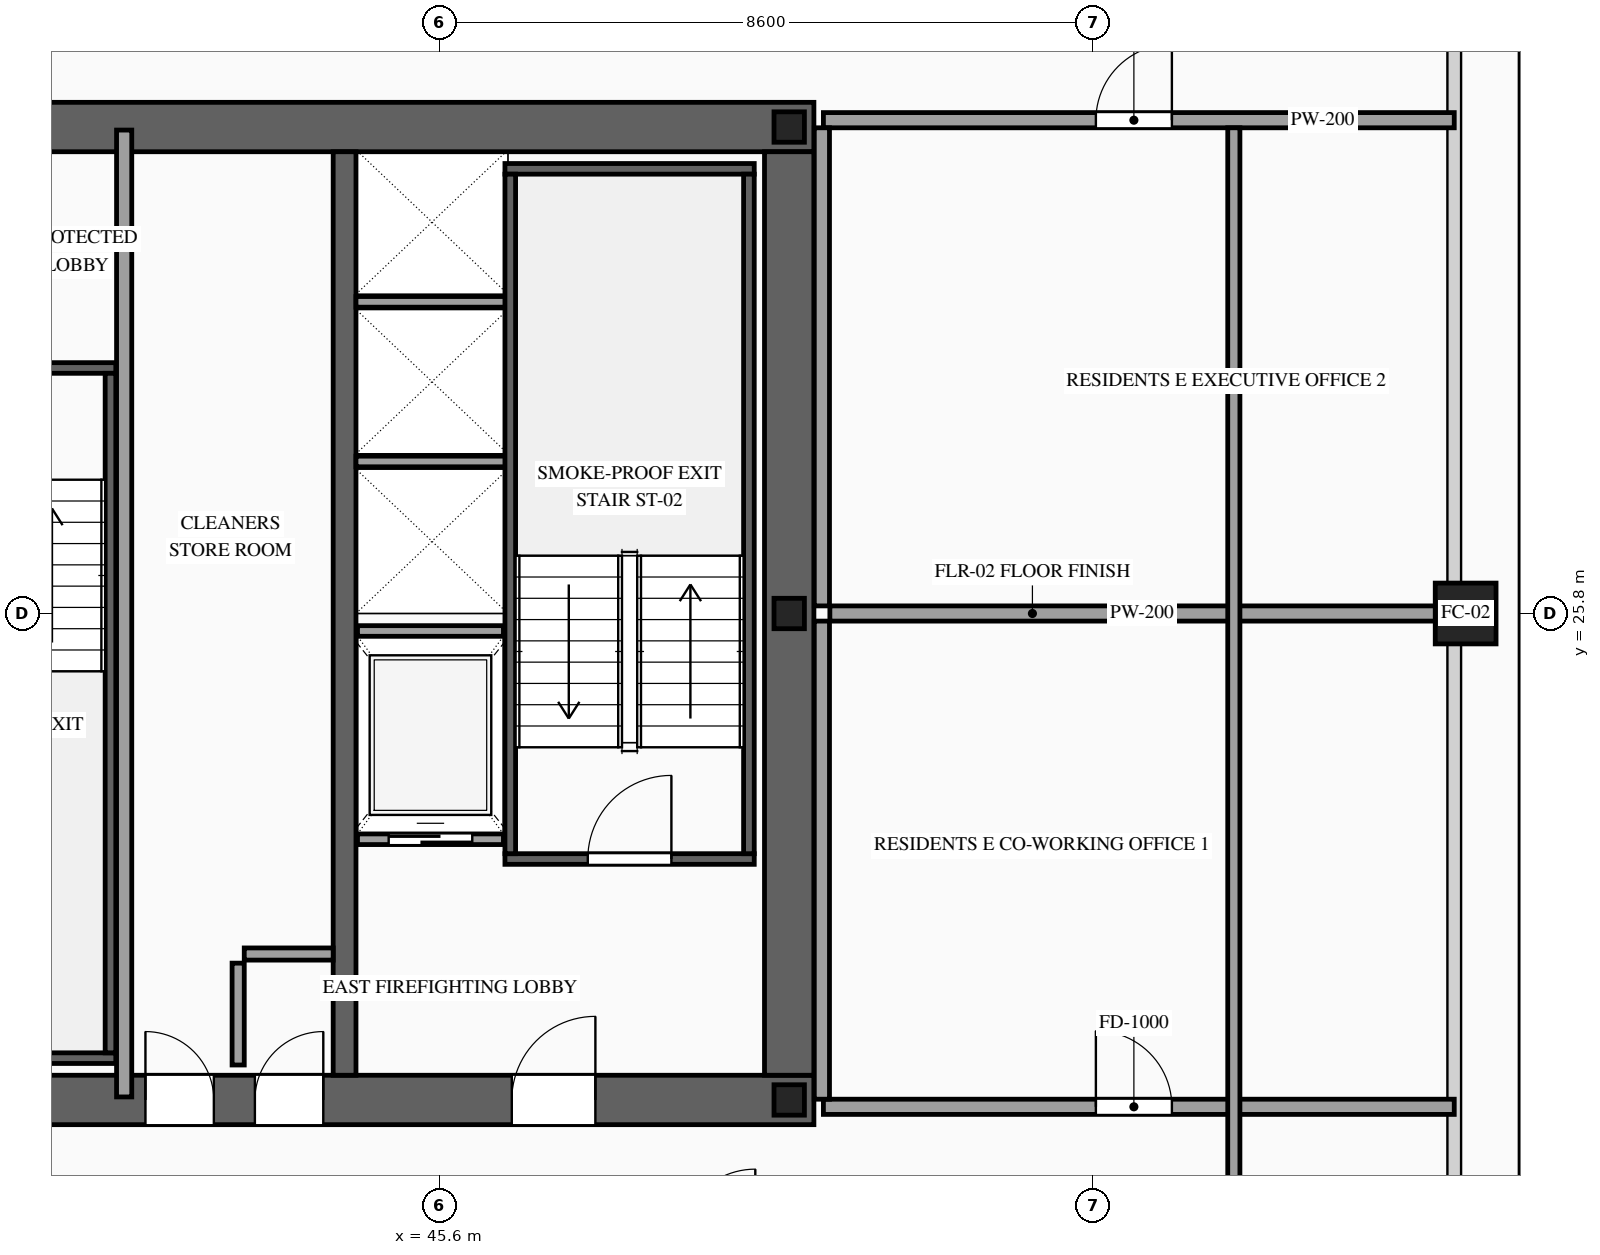
"""IFC4 building model, lengths in metres.
Left out: names, types, materials, properties, quantities, classifications, styles, units other than length and angle.
Written with IfcOpenShell. Run it as: python <this file> out.ifc"""

import sys

from ifc_helpers import new_model, si_unit, direction, frame, frame_2d, origin, origin_2d, place, context, subcontext, project, spatial, rectangle, hollow_rectangle, i_section, extrude, source, transform, mapped, element, fill, save


model = new_model("IFC4")
c1 = context("Model", 3, precision=1e-05, world=origin(), true_north=direction((0.0, 1.0)))
c2 = subcontext(c1, "Body", "Model", "MODEL_VIEW")
j1 = project(units=[si_unit("LENGTHUNIT", "METRE"), si_unit("PLANEANGLEUNIT", "RADIAN")], contexts=[c1])
p1 = place(None, origin())
s1 = spatial("IfcSite", under=j1, at=p1, CompositionType="ELEMENT")
p2 = place(p1, origin())
s2 = spatial("IfcBuilding", under=s1, at=p2, CompositionType="ELEMENT")
p3 = place(p2, frame((0.0, 0.0, 209.0)))
s3 = spatial("IfcBuildingStorey", under=s2, at=p3, CompositionType="ELEMENT", Elevation=209.0)
p4 = place(p3, frame((23.475, 19.4, 0.0), z_axis=(0.0, 0.0, 1.0), x_axis=(1.0, 0.0, 0.0)))
e1 = element("IfcWall", 1, at=p4, inside=s3, PredefinedType="SHEAR", context=c2, shape_type="SweptSolid", body=[
    extrude(rectangle(XDim=27.05, YDim=0.65, at=frame_2d((13.525, 0.0))), origin(), (0.0, 0.0, 1.0), 3.5),
])
p5 = place(p4, frame((1.975, 0.0, 0.0)))
e2 = element("IfcOpeningElement", 2, at=p5, cuts=e1, PredefinedType="OPENING", context=c2, shape_type="SweptSolid", body=[
    extrude(rectangle(XDim=1.1, YDim=2.2, at=frame_2d((0.55, 1.1))), frame((0.0, 0.34, 0.0), z_axis=(0.0, -1.0, 0.0), x_axis=(1.0, 0.0, 0.0)), (0.0, 0.0, 1.0), 0.68),
])
p6 = place(p4, frame((9.875, 0.0, 0.0)))
e3 = element("IfcOpeningElement", 3, at=p6, cuts=e1, PredefinedType="OPENING", context=c2, shape_type="SweptSolid", body=[
    extrude(rectangle(XDim=1.1, YDim=2.2, at=frame_2d((0.55, 1.1))), frame((0.0, 0.34, 0.0), z_axis=(0.0, -1.0, 0.0), x_axis=(1.0, 0.0, 0.0)), (0.0, 0.0, 1.0), 0.68),
])
p7 = place(p4, frame((23.075, 0.0, 0.0)))
e4 = element("IfcOpeningElement", 4, at=p7, cuts=e1, PredefinedType="OPENING", context=c2, shape_type="SweptSolid", body=[
    extrude(rectangle(XDim=1.1, YDim=2.2, at=frame_2d((0.55, 1.1))), frame((0.0, 0.34, 0.0), z_axis=(0.0, -1.0, 0.0), x_axis=(1.0, 0.0, 0.0)), (0.0, 0.0, 1.0), 0.68),
])
p8 = place(p4, frame((19.695, 0.0, 0.0)))
e5 = element("IfcOpeningElement", 5, at=p8, cuts=e1, PredefinedType="OPENING", context=c2, shape_type="SweptSolid", body=[
    extrude(rectangle(XDim=0.9, YDim=2.15, at=frame_2d((0.45, 1.075))), frame((0.0, 0.34, 0.0), z_axis=(0.0, -1.0, 0.0), x_axis=(1.0, 0.0, 0.0)), (0.0, 0.0, 1.0), 0.68),
])
p9 = place(p4, frame((18.255, 0.0, 0.0)))
e6 = element("IfcOpeningElement", 6, at=p9, cuts=e1, PredefinedType="OPENING", context=c2, shape_type="SweptSolid", body=[
    extrude(rectangle(XDim=0.9, YDim=2.15, at=frame_2d((0.45, 1.075))), frame((0.0, 0.34, 0.0), z_axis=(0.0, -1.0, 0.0), x_axis=(1.0, 0.0, 0.0)), (0.0, 0.0, 1.0), 0.68),
])
p10 = place(p3, frame((23.475, 32.2, 0.0), z_axis=(0.0, 0.0, 1.0), x_axis=(1.0, 0.0, 0.0)))
e7 = element("IfcWall", 7, at=p10, inside=s3, PredefinedType="SHEAR", context=c2, shape_type="SweptSolid", body=[
    extrude(rectangle(XDim=27.05, YDim=0.65, at=frame_2d((13.525, 0.0))), origin(), (0.0, 0.0, 1.0), 3.5),
])
p11 = place(p10, frame((4.595, 0.0, 0.0)))
e8 = element("IfcOpeningElement", 8, at=p11, cuts=e7, PredefinedType="OPENING", context=c2, shape_type="SweptSolid", body=[
    extrude(rectangle(XDim=0.9, YDim=2.15, at=frame_2d((0.45, 1.075))), frame((0.0, 0.34, 0.0), z_axis=(0.0, -1.0, 0.0), x_axis=(1.0, 0.0, 0.0)), (0.0, 0.0, 1.0), 0.68),
])
p12 = place(p10, frame((9.875, 0.0, 0.0)))
e9 = element("IfcOpeningElement", 9, at=p12, cuts=e7, PredefinedType="OPENING", context=c2, shape_type="SweptSolid", body=[
    extrude(rectangle(XDim=1.1, YDim=2.2, at=frame_2d((0.55, 1.1))), frame((0.0, 0.34, 0.0), z_axis=(0.0, -1.0, 0.0), x_axis=(1.0, 0.0, 0.0)), (0.0, 0.0, 1.0), 0.68),
])
p13 = place(p10, frame((15.725, 0.0, 0.0)))
e10 = element("IfcOpeningElement", 10, at=p13, cuts=e7, PredefinedType="OPENING", context=c2, shape_type="SweptSolid", body=[
    extrude(rectangle(XDim=1.1, YDim=2.2, at=frame_2d((0.55, 1.1))), frame((0.0, 0.34, 0.0), z_axis=(0.0, -1.0, 0.0), x_axis=(1.0, 0.0, 0.0)), (0.0, 0.0, 1.0), 0.68),
])
m1 = source(origin(), c2, "Body", "SweptSolid", [
    extrude(rectangle(XDim=12.15, YDim=0.65, at=frame_2d((6.075, 0.0))), origin(), (0.0, 0.0, 1.0), 3.5),
])
p14 = place(p3, frame((50.2, 19.725, 0.0), z_axis=(0.0, 0.0, 1.0), x_axis=(0.0, 1.0, 0.0)))
e11 = element("IfcWall", 11, at=p14, inside=s3, PredefinedType="SHEAR", context=c2, shape_type="MappedRepresentation", body=[
    mapped(m1, transform((0.0, 0.0, 0.0), scale=1.0)),
])
m2 = source(origin(), c2, "Body", "SweptSolid", [
    extrude(rectangle(XDim=12.15, YDim=0.3, at=frame_2d((6.075, 0.0))), origin(), (0.0, 0.0, 1.0), 3.5),
])
p15 = place(p3, frame((44.35, 19.725, 0.0), z_axis=(0.0, 0.0, 1.0), x_axis=(0.0, 1.0, 0.0)))
e12 = element("IfcWall", 12, at=p15, inside=s3, PredefinedType="SOLIDWALL", context=c2, shape_type="MappedRepresentation", body=[
    mapped(m2, transform((0.0, 0.0, 0.0), scale=1.0)),
])
m3 = source(origin(), c2, "Body", "SweptSolid", [
    extrude(i_section(OverallWidth=0.4, OverallDepth=0.4, WebThickness=0.013, FlangeThickness=0.021, at=origin_2d()), origin(), (0.0, 0.0, 1.0), 3.5),
])
for number, where, z_axis, x_axis in (
    (13, (50.2, 19.4, 0.0), (0.0, 0.0, 1.0), (1.0, 0.0, 0.0)),
    (14, (50.2, 25.8, 0.0), (0.0, 0.0, 1.0), (1.0, 0.0, 0.0)),
    (15, (50.2, 32.2, 0.0), (0.0, 0.0, 1.0), (1.0, 0.0, 0.0)),
):
    element("IfcColumn", number, at=place(p3, frame(where, z_axis=z_axis, x_axis=x_axis)), inside=s3, PredefinedType="COLUMN", context=c2, shape_type="MappedRepresentation", body=[
        mapped(m3, transform((0.0, 0.0, 0.0), scale=1.0)),
    ])
m4 = source(origin(), c2, "Body", "SweptSolid", [
    extrude(hollow_rectangle(XDim=0.8, YDim=0.8, WallThickness=0.036, at=origin_2d()), origin(), (0.0, 0.0, 1.0), 3.5),
])
p16 = place(p3, frame((59.1, 25.8, 0.0), z_axis=(0.0, 0.0, 1.0), x_axis=(1.0, 0.0, 0.0)))
e16 = element("IfcColumn", 16, at=p16, inside=s3, PredefinedType="COLUMN", context=c2, shape_type="MappedRepresentation", body=[
    mapped(m4, transform((0.0, 0.0, 0.0), scale=1.0)),
])
p17 = place(p3, frame((44.52, 22.83, 0.0), z_axis=(0.0, 0.0, 1.0), x_axis=(1.0, 0.0, 0.0)))
e17 = element("IfcWall", 17, at=p17, inside=s3, PredefinedType="SOLIDWALL", context=c2, shape_type="SweptSolid", body=[
    extrude(rectangle(XDim=1.92, YDim=0.14, at=frame_2d((0.96, 0.0))), origin(), (0.0, 0.0, 1.0), 3.28),
])
p18 = place(p17, frame((0.41, 0.0, 0.0)))
e18 = element("IfcOpeningElement", 18, at=p18, cuts=e17, PredefinedType="OPENING", context=c2, shape_type="SweptSolid", body=[
    extrude(rectangle(XDim=1.1, YDim=2.2, at=frame_2d((0.55, 1.1))), frame((0.0, 0.085, 0.0), z_axis=(0.0, -1.0, 0.0), x_axis=(1.0, 0.0, 0.0)), (0.0, 0.0, 1.0), 0.17),
])
m5 = source(origin(), c2, "Body", "SweptSolid", [
    extrude(rectangle(XDim=1.92, YDim=0.14, at=frame_2d((0.96, 0.0))), origin(), (0.0, 0.0, 1.0), 3.28),
])
p19 = place(p3, frame((44.52, 25.57, 0.0), z_axis=(0.0, 0.0, 1.0), x_axis=(1.0, 0.0, 0.0)))
e19 = element("IfcWall", 19, at=p19, inside=s3, PredefinedType="SOLIDWALL", context=c2, shape_type="MappedRepresentation", body=[
    mapped(m5, transform((0.0, 0.0, 0.0), scale=1.0)),
])
m6 = source(origin(), c2, "Body", "SweptSolid", [
    extrude(rectangle(XDim=2.0, YDim=0.14, at=frame_2d((1.0, 0.0))), origin(), (0.0, 0.0, 1.0), 3.28),
])
for number, where, z_axis, x_axis in (
    (20, (44.5, 27.8, 0.0), (0.0, 0.0, 1.0), (1.0, 0.0, 0.0)),
    (21, (44.5, 29.9, 0.0), (0.0, 0.0, 1.0), (1.0, 0.0, 0.0)),
):
    element("IfcWall", number, at=place(p3, frame(where, z_axis=z_axis, x_axis=x_axis)), inside=s3, PredefinedType="SOLIDWALL", context=c2, shape_type="MappedRepresentation", body=[
        mapped(m6, transform((0.0, 0.0, 0.0), scale=1.0)),
    ])
p20 = place(p3, frame((46.46, 22.57, 0.0), z_axis=(0.0, 0.0, 1.0), x_axis=(1.0, 0.0, 0.0)))
e22 = element("IfcWall", 22, at=p20, inside=s3, PredefinedType="SOLIDWALL", context=c2, shape_type="SweptSolid", body=[
    extrude(rectangle(XDim=3.28, YDim=0.14, at=frame_2d((1.64, 0.0))), origin(), (0.0, 0.0, 1.0), 3.28),
])
p21 = place(p20, frame((1.09, 0.0, 0.0)))
e23 = element("IfcOpeningElement", 23, at=p21, cuts=e22, PredefinedType="OPENING", context=c2, shape_type="SweptSolid", body=[
    extrude(rectangle(XDim=1.1, YDim=2.2, at=frame_2d((0.55, 1.1))), frame((0.0, 0.085, 0.0), z_axis=(0.0, -1.0, 0.0), x_axis=(1.0, 0.0, 0.0)), (0.0, 0.0, 1.0), 0.17),
])
m7 = source(origin(), c2, "Body", "SweptSolid", [
    extrude(rectangle(XDim=3.28, YDim=0.14, at=frame_2d((1.64, 0.0))), origin(), (0.0, 0.0, 1.0), 3.28),
])
p22 = place(p3, frame((46.46, 31.65, 0.0), z_axis=(0.0, 0.0, 1.0), x_axis=(1.0, 0.0, 0.0)))
e24 = element("IfcWall", 24, at=p22, inside=s3, PredefinedType="SOLIDWALL", context=c2, shape_type="MappedRepresentation", body=[
    mapped(m7, transform((0.0, 0.0, 0.0), scale=1.0)),
])
m8 = source(origin(), c2, "Body", "SweptSolid", [
    extrude(rectangle(XDim=8.94, YDim=0.14, at=frame_2d((4.47, 0.0))), origin(), (0.0, 0.0, 1.0), 3.28),
])
for number, where, z_axis, x_axis in (
    (25, (46.53, 22.64, 0.0), (0.0, 0.0, 1.0), (0.0, 1.0, 0.0)),
    (26, (49.67, 22.64, 0.0), (0.0, 0.0, 1.0), (0.0, 1.0, 0.0)),
):
    element("IfcWall", number, at=place(p3, frame(where, z_axis=z_axis, x_axis=x_axis)), inside=s3, PredefinedType="SOLIDWALL", context=c2, shape_type="MappedRepresentation", body=[
        mapped(m8, transform((0.0, 0.0, 0.0), scale=1.0)),
    ])
p23 = place(p3, frame((38.2, 29.03, 0.0), z_axis=(0.0, 0.0, 1.0), x_axis=(1.0, 0.0, 0.0)))
e27 = element("IfcWall", 27, at=p23, inside=s3, PredefinedType="SOLIDWALL", context=c2, shape_type="SweptSolid", body=[
    extrude(rectangle(XDim=3.14, YDim=0.14, at=frame_2d((1.57, 0.0))), origin(), (0.0, 0.0, 1.0), 3.28),
])
p24 = place(p23, frame((1.02, 0.0, 0.0)))
e28 = element("IfcOpeningElement", 28, at=p24, cuts=e27, PredefinedType="OPENING", context=c2, shape_type="SweptSolid", body=[
    extrude(rectangle(XDim=1.1, YDim=2.2, at=frame_2d((0.55, 1.1))), frame((0.0, 0.085, 0.0), z_axis=(0.0, -1.0, 0.0), x_axis=(1.0, 0.0, 0.0)), (0.0, 0.0, 1.0), 0.17),
])
m9 = source(origin(), c2, "Body", "SweptSolid", [
    extrude(rectangle(XDim=3.14, YDim=0.14, at=frame_2d((1.57, 0.0))), origin(), (0.0, 0.0, 1.0), 3.28),
])
p25 = place(p3, frame((38.2, 19.95, 0.0), z_axis=(0.0, 0.0, 1.0), x_axis=(1.0, 0.0, 0.0)))
e29 = element("IfcWall", 29, at=p25, inside=s3, PredefinedType="SOLIDWALL", context=c2, shape_type="MappedRepresentation", body=[
    mapped(m9, transform((0.0, 0.0, 0.0), scale=1.0)),
])
m10 = source(origin(), c2, "Body", "SweptSolid", [
    extrude(rectangle(XDim=8.94, YDim=0.14, at=frame_2d((4.47, 0.0))), origin(), (0.0, 0.0, 1.0), 3.28),
])
p26 = place(p3, frame((41.27, 20.02, 0.0), z_axis=(0.0, 0.0, 1.0), x_axis=(0.0, 1.0, 0.0)))
e30 = element("IfcWall", 30, at=p26, inside=s3, PredefinedType="SOLIDWALL", context=c2, shape_type="MappedRepresentation", body=[
    mapped(m10, transform((0.0, 0.0, 0.0), scale=1.0)),
])
m11 = source(origin(), c2, "Body", "SweptSolid", [
    extrude(rectangle(XDim=1.34, YDim=0.16, at=frame_2d((0.67, 0.0))), origin(), (0.0, 0.0, 1.0), 3.28),
])
p27 = place(p3, frame((42.95, 19.86, 0.0), z_axis=(0.0, 0.0, 1.0), x_axis=(0.0, 1.0, 0.0)))
e31 = element("IfcWall", 31, at=p27, inside=s3, PredefinedType="PARTITIONING", context=c2, shape_type="MappedRepresentation", body=[
    mapped(m11, transform((0.0, 0.0, 0.0), scale=1.0)),
])
m12 = source(origin(), c2, "Body", "SweptSolid", [
    extrude(rectangle(XDim=1.17, YDim=0.16, at=frame_2d((0.585, 0.0))), origin(), (0.0, 0.0, 1.0), 3.28),
])
p28 = place(p3, frame((43.03, 21.32, 0.0), z_axis=(0.0, 0.0, 1.0), x_axis=(1.0, 0.0, 0.0)))
e32 = element("IfcWall", 32, at=p28, inside=s3, PredefinedType="PARTITIONING", context=c2, shape_type="MappedRepresentation", body=[
    mapped(m12, transform((0.0, 0.0, 0.0), scale=1.0)),
])
m13 = source(origin(), c2, "Body", "SweptSolid", [
    extrude(rectangle(XDim=12.72, YDim=0.2, at=frame_2d((6.36, 0.0))), origin(), (0.0, 0.0, 1.0), 3.28),
])
p29 = place(p3, frame((41.45, 19.44, 0.0), z_axis=(0.0, 0.0, 1.0), x_axis=(0.0, 1.0, 0.0)))
e33 = element("IfcWall", 33, at=p29, inside=s3, PredefinedType="PARTITIONING", context=c2, shape_type="MappedRepresentation", body=[
    mapped(m13, transform((0.0, 0.0, 0.0), scale=1.0)),
])
p30 = place(p3, frame((50.65, 19.31, 0.0), z_axis=(0.0, 0.0, 1.0), x_axis=(1.0, 0.0, 0.0)))
e34 = element("IfcWall", 34, at=p30, inside=s3, PredefinedType="PARTITIONING", context=c2, shape_type="SweptSolid", body=[
    extrude(rectangle(XDim=8.3, YDim=0.2, at=frame_2d((4.15, 0.0))), origin(), (0.0, 0.0, 1.0), 2.775),
])
p31 = place(p30, frame((3.585, 0.0, 0.0)))
e35 = element("IfcOpeningElement", 35, at=p31, cuts=e34, PredefinedType="OPENING", context=c2, shape_type="SweptSolid", body=[
    extrude(rectangle(XDim=1.0, YDim=2.2, at=frame_2d((0.5, 1.1))), frame((0.0, 0.115, 0.0), z_axis=(0.0, -1.0, 0.0), x_axis=(1.0, 0.0, 0.0)), (0.0, 0.0, 1.0), 0.23),
])
m14 = source(origin(), c2, "Body", "SweptSolid", [
    extrude(rectangle(XDim=8.215, YDim=0.2, at=frame_2d((4.107, 0.0))), origin(), (0.0, 0.0, 1.0), 2.687),
])
p32 = place(p3, frame((50.735, 25.8, 0.0), z_axis=(0.0, 0.0, 1.0), x_axis=(1.0, 0.0, 0.0)))
e36 = element("IfcWall", 36, at=p32, inside=s3, PredefinedType="PARTITIONING", context=c2, shape_type="MappedRepresentation", body=[
    mapped(m14, transform((0.0, 0.0, 0.0), scale=1.0)),
])
m15 = source(origin(), c2, "Body", "SweptSolid", [
    extrude(rectangle(XDim=6.29, YDim=0.2, at=frame_2d((3.145, 0.0))), origin(), (0.0, 0.0, 1.0), 3.28),
])
p33 = place(p3, frame((50.63, 19.41, 0.0), z_axis=(0.0, 0.0, 1.0), x_axis=(0.0, 1.0, 0.0)))
e37 = element("IfcWall", 37, at=p33, inside=s3, PredefinedType="PARTITIONING", context=c2, shape_type="MappedRepresentation", body=[
    mapped(m15, transform((0.0, 0.0, 0.0), scale=1.0)),
])
p34 = place(p3, frame((50.65, 32.29, 0.0), z_axis=(0.0, 0.0, 1.0), x_axis=(1.0, 0.0, 0.0)))
e38 = element("IfcWall", 38, at=p34, inside=s3, PredefinedType="PARTITIONING", context=c2, shape_type="SweptSolid", body=[
    extrude(rectangle(XDim=8.3, YDim=0.2, at=frame_2d((4.15, 0.0))), origin(), (0.0, 0.0, 1.0), 2.775),
])
p35 = place(p34, frame((3.585, 0.0, 0.0)))
e39 = element("IfcOpeningElement", 39, at=p35, cuts=e38, PredefinedType="OPENING", context=c2, shape_type="SweptSolid", body=[
    extrude(rectangle(XDim=1.0, YDim=2.2, at=frame_2d((0.5, 1.1))), frame((0.0, 0.115, 0.0), z_axis=(0.0, -1.0, 0.0), x_axis=(1.0, 0.0, 0.0)), (0.0, 0.0, 1.0), 0.23),
])
m16 = source(origin(), c2, "Body", "SweptSolid", [
    extrude(rectangle(XDim=28.19, YDim=0.16, at=frame_2d((14.095, 0.0))), origin(), (0.0, 0.0, 1.0), 3.28),
])
p36 = place(p3, frame((56.05, 4.0, 0.0), z_axis=(0.0, 0.0, 1.0), x_axis=(0.0, 1.0, 0.0)))
e40 = element("IfcWall", 40, at=p36, inside=s3, PredefinedType="PARTITIONING", context=c2, shape_type="MappedRepresentation", body=[
    mapped(m16, transform((0.0, 0.0, 0.0), scale=1.0)),
])
p37 = place(p3, frame((50.63, 25.9, 0.0), z_axis=(0.0, 0.0, 1.0), x_axis=(0.0, 1.0, 0.0)))
e41 = element("IfcWall", 41, at=p37, inside=s3, PredefinedType="PARTITIONING", context=c2, shape_type="MappedRepresentation", body=[
    mapped(m15, transform((0.0, 0.0, 0.0), scale=1.0)),
])
m17 = source(origin(), c2, "Body", "SweptSolid", [
    extrude(rectangle(XDim=1.1, YDim=2.2, at=frame_2d((0.55, 1.1))), frame((0.0, 0.025, 0.0), z_axis=(0.0, -1.0, 0.0), x_axis=(1.0, 0.0, 0.0)), (0.0, 0.0, 1.0), 0.05),
])
p38 = place(p18, origin())
e42 = element("IfcDoor", 42, at=p38, inside=s3, OperationType="SLIDING_TO_RIGHT", PredefinedType="DOOR", context=c2, shape_type="MappedRepresentation", body=[
    mapped(m17, transform((0.0, 0.0, 0.0), scale=1.0)),
])
fill(e18, e42)
m18 = source(origin(), c2, "Body", "SweptSolid", [
    extrude(rectangle(XDim=1.1, YDim=2.2, at=frame_2d((0.55, 1.1))), frame((0.0, 0.025, 0.0), z_axis=(0.0, -1.0, 0.0), x_axis=(1.0, 0.0, 0.0)), (0.0, 0.0, 1.0), 0.05),
])
p39 = place(p21, origin())
e43 = element("IfcDoor", 43, at=p39, inside=s3, OperationType="SINGLE_SWING_RIGHT", PredefinedType="DOOR", context=c2, shape_type="MappedRepresentation", body=[
    mapped(m18, transform((0.0, 0.0, 0.0), scale=1.0)),
])
fill(e23, e43)
p40 = place(p7, origin())
e44 = element("IfcDoor", 44, at=p40, inside=s3, OperationType="SINGLE_SWING_RIGHT", PredefinedType="DOOR", context=c2, shape_type="MappedRepresentation", body=[
    mapped(m18, transform((0.0, 0.0, 0.0), scale=1.0)),
])
fill(e4, e44)
m19 = source(origin(), c2, "Body", "SweptSolid", [
    extrude(rectangle(XDim=0.9, YDim=2.15, at=frame_2d((0.45, 1.075))), frame((0.0, 0.025, 0.0), z_axis=(0.0, -1.0, 0.0), x_axis=(1.0, 0.0, 0.0)), (0.0, 0.0, 1.0), 0.05),
])
p41 = place(p8, origin())
e45 = element("IfcDoor", 45, at=p41, inside=s3, OperationType="SINGLE_SWING_RIGHT", PredefinedType="DOOR", context=c2, shape_type="MappedRepresentation", body=[
    mapped(m19, transform((0.0, 0.0, 0.0), scale=1.0)),
])
fill(e5, e45)
p42 = place(p9, origin())
e46 = element("IfcDoor", 46, at=p42, inside=s3, OperationType="SINGLE_SWING_LEFT", PredefinedType="DOOR", context=c2, shape_type="MappedRepresentation", body=[
    mapped(m19, transform((0.0, 0.0, 0.0), scale=1.0)),
])
fill(e6, e46)
m20 = source(origin(), c2, "Body", "SweptSolid", [
    extrude(rectangle(XDim=1.0, YDim=2.2, at=frame_2d((0.5, 1.1))), frame((0.0, 0.025, 0.0), z_axis=(0.0, -1.0, 0.0), x_axis=(1.0, 0.0, 0.0)), (0.0, 0.0, 1.0), 0.05),
])
p43 = place(p31, origin())
e47 = element("IfcDoor", 47, at=p43, inside=s3, OperationType="SINGLE_SWING_LEFT", PredefinedType="DOOR", context=c2, shape_type="MappedRepresentation", body=[
    mapped(m20, transform((0.0, 0.0, 0.0), scale=1.0)),
])
fill(e35, e47)
p44 = place(p35, origin())
e48 = element("IfcDoor", 48, at=p44, inside=s3, OperationType="SINGLE_SWING_RIGHT", PredefinedType="DOOR", context=c2, shape_type="MappedRepresentation", body=[
    mapped(m20, transform((0.0, 0.0, 0.0), scale=1.0)),
])
fill(e39, e48)
save(model, sys.argv[1])
